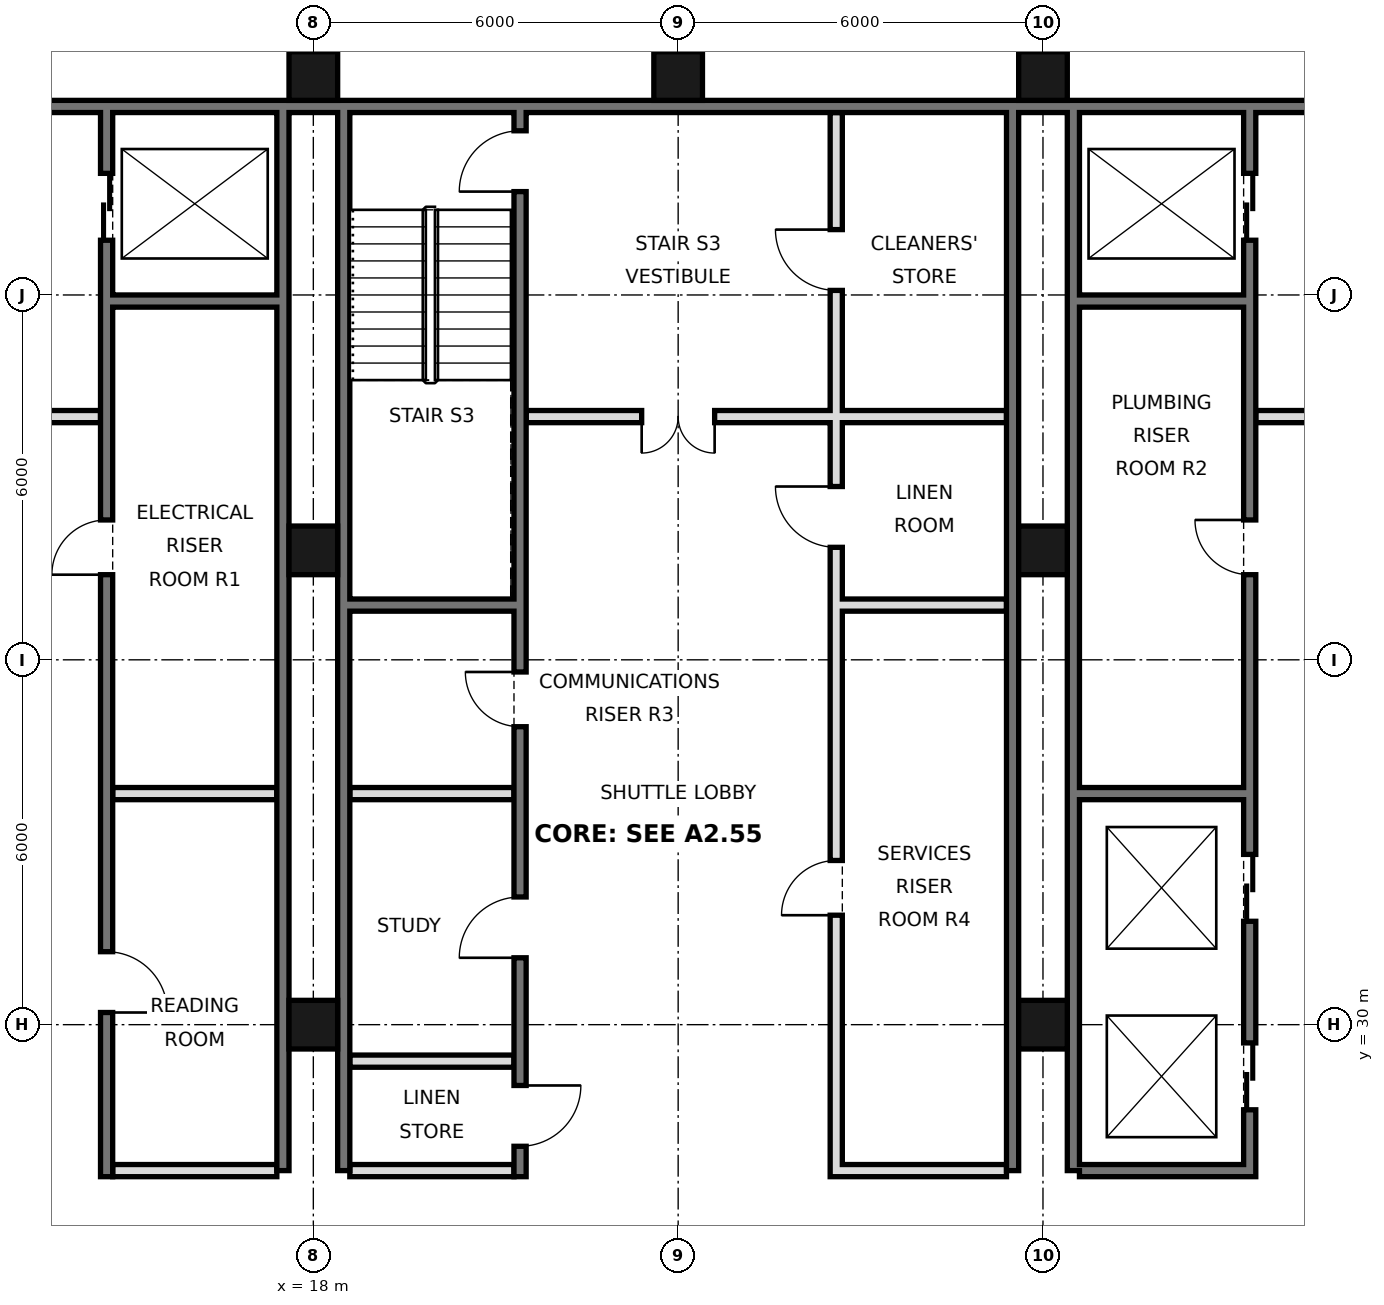
"""IFC4 building model, lengths in metres.
Left out: names, types, materials, properties, quantities, classifications, styles, units other than length and angle.
Written with IfcOpenShell. Run it as: python <this file> out.ifc"""

import sys

from ifc_helpers import new_model, si_unit, direction, frame, frame_2d, origin, origin_2d, place, context, subcontext, project, spatial, rectangle, hollow_rectangle, extrude, element, fill, save


model = new_model("IFC4")
c1 = context("Model", 3, precision=1e-05, world=origin(), true_north=direction((0.0, 1.0)))
c2 = subcontext(c1, "Body", "Model", "MODEL_VIEW")
j1 = project(units=[si_unit("LENGTHUNIT", "METRE"), si_unit("PLANEANGLEUNIT", "RADIAN")], contexts=[c1])
p1 = place(None, origin())
s1 = spatial("IfcSite", under=j1, at=p1, CompositionType="ELEMENT")
p2 = place(p1, origin())
s2 = spatial("IfcBuilding", under=s1, at=p2, CompositionType="ELEMENT")
p3 = place(p2, frame((0.0, 0.0, 219.0)))
s3 = spatial("IfcBuildingStorey", under=s2, at=p3, CompositionType="ELEMENT", Elevation=219.0)
for number, where, z_axis, x_axis in (
    (1, (18.0, 30.0, 0.0), (0.0, 0.0, 1.0), (1.0, 0.0, 0.0)),
    (2, (18.0, 37.8, 0.0), (0.0, 0.0, 1.0), (1.0, 0.0, 0.0)),
    (3, (18.0, 45.6, 0.0), (0.0, 0.0, 1.0), (1.0, 0.0, 0.0)),
    (4, (24.0, 45.6, 0.0), (0.0, 0.0, 1.0), (1.0, 0.0, 0.0)),
    (5, (30.0, 30.0, 0.0), (0.0, 0.0, 1.0), (1.0, 0.0, 0.0)),
    (6, (30.0, 37.8, 0.0), (0.0, 0.0, 1.0), (1.0, 0.0, 0.0)),
    (7, (30.0, 45.6, 0.0), (0.0, 0.0, 1.0), (1.0, 0.0, 0.0)),
):
    element("IfcColumn", number, at=place(p3, frame(where, z_axis=z_axis, x_axis=x_axis)), inside=s3, PredefinedType="COLUMN", context=c2, shape_type="SweptSolid", body=[
        extrude(hollow_rectangle(XDim=0.8, YDim=0.8, WallThickness=0.04, at=origin_2d()), origin(), (0.0, 0.0, 1.0), 3.6),
    ])
p4 = place(p3, frame((6.6, 45.1, 0.0), z_axis=(0.0, 0.0, 1.0), x_axis=(1.0, 0.0, 0.0)))
e8 = element("IfcWall", 8, at=p4, inside=s3, PredefinedType="SOLIDWALL", context=c2, shape_type="SweptSolid", body=[
    extrude(rectangle(XDim=34.8, YDim=0.2, at=frame_2d((17.4, 0.0))), origin(), (0.0, 0.0, 1.0), 3.42),
])
for number, where, z_axis, x_axis in (
    (9, (17.5, 27.6, 0.0), (0.0, 0.0, 1.0), (0.0, 1.0, 0.0)),
    (10, (18.5, 27.6, 0.0), (0.0, 0.0, 1.0), (0.0, 1.0, 0.0)),
    (11, (29.5, 27.6, 0.0), (0.0, 0.0, 1.0), (0.0, 1.0, 0.0)),
    (12, (30.5, 27.6, 0.0), (0.0, 0.0, 1.0), (0.0, 1.0, 0.0)),
):
    element("IfcWall", number, at=place(p3, frame(where, z_axis=z_axis, x_axis=x_axis)), inside=s3, PredefinedType="SOLIDWALL", context=c2, shape_type="SweptSolid", body=[
        extrude(rectangle(XDim=17.5, YDim=0.2, at=frame_2d((8.75, 0.0))), origin(), (0.0, 0.0, 1.0), 3.42),
    ])
p5 = place(p3, frame((14.6, 27.5, 0.0), z_axis=(0.0, 0.0, 1.0), x_axis=(0.0, 1.0, 0.0)))
e13 = element("IfcWall", 13, at=p5, inside=s3, PredefinedType="SOLIDWALL", context=c2, shape_type="SweptSolid", body=[
    extrude(rectangle(XDim=17.5, YDim=0.2, at=frame_2d((8.75, 0.0))), origin(), (0.0, 0.0, 1.0), 3.42),
])
p6 = place(p5, frame((15.4, 0.0, 0.0)))
e14 = element("IfcOpeningElement", 14, at=p6, cuts=e13, PredefinedType="OPENING", context=c2, shape_type="SweptSolid", body=[
    extrude(rectangle(XDim=1.1, YDim=2.1, at=frame_2d((0.55, 1.05))), frame((0.0, 0.11, 0.0), z_axis=(0.0, -1.0, 0.0), x_axis=(1.0, 0.0, 0.0)), (0.0, 0.0, 1.0), 0.22),
])
p7 = place(p5, frame((2.7, 0.0, 0.0)))
e15 = element("IfcOpeningElement", 15, at=p7, cuts=e13, PredefinedType="OPENING", context=c2, shape_type="SweptSolid", body=[
    extrude(rectangle(XDim=1.0, YDim=2.1, at=frame_2d((0.5, 1.05))), frame((0.0, 0.11, 0.0), z_axis=(0.0, -1.0, 0.0), x_axis=(1.0, 0.0, 0.0)), (0.0, 0.0, 1.0), 0.22),
])
p8 = place(p5, frame((9.9, 0.0, 0.0)))
e16 = element("IfcOpeningElement", 16, at=p8, cuts=e13, PredefinedType="OPENING", context=c2, shape_type="SweptSolid", body=[
    extrude(rectangle(XDim=0.9, YDim=2.1, at=frame_2d((0.45, 1.05))), frame((0.0, 0.11, 0.0), z_axis=(0.0, -1.0, 0.0), x_axis=(1.0, 0.0, 0.0)), (0.0, 0.0, 1.0), 0.22),
])
p9 = place(p3, frame((21.4, 27.5, 0.0), z_axis=(0.0, 0.0, 1.0), x_axis=(0.0, 1.0, 0.0)))
e17 = element("IfcWall", 17, at=p9, inside=s3, PredefinedType="SOLIDWALL", context=c2, shape_type="SweptSolid", body=[
    extrude(rectangle(XDim=17.5, YDim=0.2, at=frame_2d((8.75, 0.0))), origin(), (0.0, 0.0, 1.0), 3.42),
])
p10 = place(p9, frame((0.5, 0.0, 0.0)))
e18 = element("IfcOpeningElement", 18, at=p10, cuts=e17, PredefinedType="OPENING", context=c2, shape_type="SweptSolid", body=[
    extrude(rectangle(XDim=1.0, YDim=2.1, at=frame_2d((0.5, 1.05))), frame((0.0, 0.11, 0.0), z_axis=(0.0, -1.0, 0.0), x_axis=(1.0, 0.0, 0.0)), (0.0, 0.0, 1.0), 0.22),
])
p11 = place(p9, frame((3.6, 0.0, 0.0)))
e19 = element("IfcOpeningElement", 19, at=p11, cuts=e17, PredefinedType="OPENING", context=c2, shape_type="SweptSolid", body=[
    extrude(rectangle(XDim=1.0, YDim=2.1, at=frame_2d((0.5, 1.05))), frame((0.0, 0.11, 0.0), z_axis=(0.0, -1.0, 0.0), x_axis=(1.0, 0.0, 0.0)), (0.0, 0.0, 1.0), 0.22),
])
p12 = place(p9, frame((16.2, 0.0, 0.0)))
e20 = element("IfcOpeningElement", 20, at=p12, cuts=e17, PredefinedType="OPENING", context=c2, shape_type="SweptSolid", body=[
    extrude(rectangle(XDim=1.0, YDim=2.1, at=frame_2d((0.5, 1.05))), frame((0.0, 0.11, 0.0), z_axis=(0.0, -1.0, 0.0), x_axis=(1.0, 0.0, 0.0)), (0.0, 0.0, 1.0), 0.22),
])
p13 = place(p9, frame((7.4, 0.0, 0.0)))
e21 = element("IfcOpeningElement", 21, at=p13, cuts=e17, PredefinedType="OPENING", context=c2, shape_type="SweptSolid", body=[
    extrude(rectangle(XDim=0.9, YDim=2.1, at=frame_2d((0.45, 1.05))), frame((0.0, 0.11, 0.0), z_axis=(0.0, -1.0, 0.0), x_axis=(1.0, 0.0, 0.0)), (0.0, 0.0, 1.0), 0.22),
])
p14 = place(p3, frame((26.6, 27.5, 0.0), z_axis=(0.0, 0.0, 1.0), x_axis=(0.0, 1.0, 0.0)))
e22 = element("IfcWall", 22, at=p14, inside=s3, PredefinedType="SOLIDWALL", context=c2, shape_type="SweptSolid", body=[
    extrude(rectangle(XDim=17.5, YDim=0.2, at=frame_2d((8.75, 0.0))), origin(), (0.0, 0.0, 1.0), 3.42),
])
p15 = place(p14, frame((4.3, 0.0, 0.0)))
e23 = element("IfcOpeningElement", 23, at=p15, cuts=e22, PredefinedType="OPENING", context=c2, shape_type="SweptSolid", body=[
    extrude(rectangle(XDim=0.9, YDim=2.1, at=frame_2d((0.45, 1.05))), frame((0.0, 0.11, 0.0), z_axis=(0.0, -1.0, 0.0), x_axis=(1.0, 0.0, 0.0)), (0.0, 0.0, 1.0), 0.22),
])
p16 = place(p14, frame((10.35, 0.0, 0.0)))
e24 = element("IfcOpeningElement", 24, at=p16, cuts=e22, PredefinedType="OPENING", context=c2, shape_type="SweptSolid", body=[
    extrude(rectangle(XDim=1.0, YDim=2.1, at=frame_2d((0.5, 1.05))), frame((0.0, 0.11, 0.0), z_axis=(0.0, -1.0, 0.0), x_axis=(1.0, 0.0, 0.0)), (0.0, 0.0, 1.0), 0.22),
])
p17 = place(p14, frame((14.575, 0.0, 0.0)))
e25 = element("IfcOpeningElement", 25, at=p17, cuts=e22, PredefinedType="OPENING", context=c2, shape_type="SweptSolid", body=[
    extrude(rectangle(XDim=1.0, YDim=2.1, at=frame_2d((0.5, 1.05))), frame((0.0, 0.11, 0.0), z_axis=(0.0, -1.0, 0.0), x_axis=(1.0, 0.0, 0.0)), (0.0, 0.0, 1.0), 0.22),
])
p18 = place(p3, frame((33.4, 27.5, 0.0), z_axis=(0.0, 0.0, 1.0), x_axis=(0.0, 1.0, 0.0)))
e26 = element("IfcWall", 26, at=p18, inside=s3, PredefinedType="SOLIDWALL", context=c2, shape_type="SweptSolid", body=[
    extrude(rectangle(XDim=17.5, YDim=0.2, at=frame_2d((8.75, 0.0))), origin(), (0.0, 0.0, 1.0), 3.42),
])
p19 = place(p18, frame((1.1, 0.0, 0.0)))
e27 = element("IfcOpeningElement", 27, at=p19, cuts=e26, PredefinedType="OPENING", context=c2, shape_type="SweptSolid", body=[
    extrude(rectangle(XDim=1.1, YDim=2.1, at=frame_2d((0.55, 1.05))), frame((0.0, 0.11, 0.0), z_axis=(0.0, -1.0, 0.0), x_axis=(1.0, 0.0, 0.0)), (0.0, 0.0, 1.0), 0.22),
])
p20 = place(p18, frame((4.2, 0.0, 0.0)))
e28 = element("IfcOpeningElement", 28, at=p20, cuts=e26, PredefinedType="OPENING", context=c2, shape_type="SweptSolid", body=[
    extrude(rectangle(XDim=1.1, YDim=2.1, at=frame_2d((0.55, 1.05))), frame((0.0, 0.11, 0.0), z_axis=(0.0, -1.0, 0.0), x_axis=(1.0, 0.0, 0.0)), (0.0, 0.0, 1.0), 0.22),
])
p21 = place(p18, frame((15.4, 0.0, 0.0)))
e29 = element("IfcOpeningElement", 29, at=p21, cuts=e26, PredefinedType="OPENING", context=c2, shape_type="SweptSolid", body=[
    extrude(rectangle(XDim=1.1, YDim=2.1, at=frame_2d((0.55, 1.05))), frame((0.0, 0.11, 0.0), z_axis=(0.0, -1.0, 0.0), x_axis=(1.0, 0.0, 0.0)), (0.0, 0.0, 1.0), 0.22),
])
p22 = place(p18, frame((9.9, 0.0, 0.0)))
e30 = element("IfcOpeningElement", 30, at=p22, cuts=e26, PredefinedType="OPENING", context=c2, shape_type="SweptSolid", body=[
    extrude(rectangle(XDim=0.9, YDim=2.1, at=frame_2d((0.45, 1.05))), frame((0.0, 0.11, 0.0), z_axis=(0.0, -1.0, 0.0), x_axis=(1.0, 0.0, 0.0)), (0.0, 0.0, 1.0), 0.22),
])
for number, where, z_axis, x_axis in (
    (31, (14.7, 27.6, 0.0), (0.0, 0.0, 1.0), (1.0, 0.0, 0.0)),
    (32, (18.6, 27.6, 0.0), (0.0, 0.0, 1.0), (1.0, 0.0, 0.0)),
):
    element("IfcWall", number, at=place(p3, frame(where, z_axis=z_axis, x_axis=x_axis)), inside=s3, PredefinedType="PARTITIONING", context=c2, shape_type="SweptSolid", body=[
        extrude(rectangle(XDim=2.7, YDim=0.2, at=frame_2d((1.35, 0.0))), origin(), (0.0, 0.0, 1.0), 3.42),
    ])
for number, where, z_axis, x_axis in (
    (33, (26.7, 27.6, 0.0), (0.0, 0.0, 1.0), (1.0, 0.0, 0.0)),
    (34, (30.6, 27.6, 0.0), (0.0, 0.0, 1.0), (1.0, 0.0, 0.0)),
):
    element("IfcWall", number, at=place(p3, frame(where, z_axis=z_axis, x_axis=x_axis)), inside=s3, PredefinedType="SOLIDWALL", context=c2, shape_type="SweptSolid", body=[
        extrude(rectangle(XDim=2.7, YDim=0.2, at=frame_2d((1.35, 0.0))), origin(), (0.0, 0.0, 1.0), 3.42),
    ])
p23 = place(p3, frame((18.6, 29.4, 0.0), z_axis=(0.0, 0.0, 1.0), x_axis=(1.0, 0.0, 0.0)))
e35 = element("IfcWall", 35, at=p23, inside=s3, PredefinedType="PARTITIONING", context=c2, shape_type="SweptSolid", body=[
    extrude(rectangle(XDim=2.7, YDim=0.2, at=frame_2d((1.35, 0.0))), origin(), (0.0, 0.0, 1.0), 3.42),
])
for number, where, z_axis, x_axis in (
    (36, (14.7, 33.8, 0.0), (0.0, 0.0, 1.0), (1.0, 0.0, 0.0)),
    (37, (18.6, 33.8, 0.0), (0.0, 0.0, 1.0), (1.0, 0.0, 0.0)),
    (38, (30.6, 33.8, 0.0), (0.0, 0.0, 1.0), (1.0, 0.0, 0.0)),
    (39, (18.6, 36.9, 0.0), (0.0, 0.0, 1.0), (1.0, 0.0, 0.0)),
    (40, (26.7, 36.9, 0.0), (0.0, 0.0, 1.0), (1.0, 0.0, 0.0)),
):
    element("IfcWall", number, at=place(p3, frame(where, z_axis=z_axis, x_axis=x_axis)), inside=s3, PredefinedType="SOLIDWALL", context=c2, shape_type="SweptSolid", body=[
        extrude(rectangle(XDim=2.7, YDim=0.2, at=frame_2d((1.35, 0.0))), origin(), (0.0, 0.0, 1.0), 3.42),
    ])
p24 = place(p3, frame((21.5, 40.0, 0.0), z_axis=(0.0, 0.0, 1.0), x_axis=(1.0, 0.0, 0.0)))
e41 = element("IfcWall", 41, at=p24, inside=s3, PredefinedType="PARTITIONING", context=c2, shape_type="SweptSolid", body=[
    extrude(rectangle(XDim=7.9, YDim=0.2, at=frame_2d((3.95, 0.0))), origin(), (0.0, 0.0, 1.0), 3.42),
])
p25 = place(p24, frame((1.9, 0.0, 0.0)))
e42 = element("IfcOpeningElement", 42, at=p25, cuts=e41, PredefinedType="OPENING", context=c2, shape_type="SweptSolid", body=[
    extrude(rectangle(XDim=1.2, YDim=2.1, at=frame_2d((0.6, 1.05))), frame((0.0, 0.11, 0.0), z_axis=(0.0, -1.0, 0.0), x_axis=(1.0, 0.0, 0.0)), (0.0, 0.0, 1.0), 0.22),
])
p26 = place(p3, frame((33.5, 40.0, 0.0), z_axis=(0.0, 0.0, 1.0), x_axis=(1.0, 0.0, 0.0)))
e43 = element("IfcWall", 43, at=p26, inside=s3, PredefinedType="PARTITIONING", context=c2, shape_type="SweptSolid", body=[
    extrude(rectangle(XDim=5.0, YDim=0.2, at=frame_2d((2.5, 0.0))), origin(), (0.0, 0.0, 1.0), 3.42),
])
p27 = place(p26, frame((1.9, 0.0, 0.0)))
e44 = element("IfcOpeningElement", 44, at=p27, cuts=e43, PredefinedType="OPENING", context=c2, shape_type="SweptSolid", body=[
    extrude(rectangle(XDim=1.2, YDim=2.1, at=frame_2d((0.6, 1.05))), frame((0.0, 0.11, 0.0), z_axis=(0.0, -1.0, 0.0), x_axis=(1.0, 0.0, 0.0)), (0.0, 0.0, 1.0), 0.22),
])
p28 = place(p3, frame((9.5, 40.0, 0.0), z_axis=(0.0, 0.0, 1.0), x_axis=(1.0, 0.0, 0.0)))
e45 = element("IfcWall", 45, at=p28, inside=s3, PredefinedType="PARTITIONING", context=c2, shape_type="SweptSolid", body=[
    extrude(rectangle(XDim=5.0, YDim=0.2, at=frame_2d((2.5, 0.0))), origin(), (0.0, 0.0, 1.0), 3.42),
])
p29 = place(p28, frame((1.9, 0.0, 0.0)))
e46 = element("IfcOpeningElement", 46, at=p29, cuts=e45, PredefinedType="OPENING", context=c2, shape_type="SweptSolid", body=[
    extrude(rectangle(XDim=1.2, YDim=2.1, at=frame_2d((0.6, 1.05))), frame((0.0, 0.11, 0.0), z_axis=(0.0, -1.0, 0.0), x_axis=(1.0, 0.0, 0.0)), (0.0, 0.0, 1.0), 0.22),
])
for number, where, z_axis, x_axis in (
    (47, (14.7, 41.9, 0.0), (0.0, 0.0, 1.0), (1.0, 0.0, 0.0)),
    (48, (30.6, 41.9, 0.0), (0.0, 0.0, 1.0), (1.0, 0.0, 0.0)),
):
    element("IfcWall", number, at=place(p3, frame(where, z_axis=z_axis, x_axis=x_axis)), inside=s3, PredefinedType="SOLIDWALL", context=c2, shape_type="SweptSolid", body=[
        extrude(rectangle(XDim=2.7, YDim=0.2, at=frame_2d((1.35, 0.0))), origin(), (0.0, 0.0, 1.0), 3.42),
    ])
p30 = place(p25, frame((1.2, 0.0, 0.0), z_axis=(0.0, 0.0, 1.0), x_axis=(-1.0, 0.0, 0.0)))
e49 = element("IfcDoor", 49, at=p30, inside=s3, OperationType="DOUBLE_DOOR_SINGLE_SWING", PredefinedType="DOOR", context=c2, shape_type="SweptSolid", body=[
    extrude(rectangle(XDim=1.2, YDim=2.1, at=frame_2d((0.6, 1.05))), frame((0.0, 0.025, 0.0), z_axis=(0.0, -1.0, 0.0), x_axis=(1.0, 0.0, 0.0)), (0.0, 0.0, 1.0), 0.05),
])
fill(e42, e49)
p31 = place(p19, origin())
e50 = element("IfcDoor", 50, at=p31, inside=s3, OperationType="DOUBLE_DOOR_SLIDING", PredefinedType="DOOR", context=c2, shape_type="SweptSolid", body=[
    extrude(rectangle(XDim=1.1, YDim=2.1, at=frame_2d((0.55, 1.05))), frame((0.0, 0.025, 0.0), z_axis=(0.0, -1.0, 0.0), x_axis=(1.0, 0.0, 0.0)), (0.0, 0.0, 1.0), 0.05),
])
fill(e27, e50)
p32 = place(p20, origin())
e51 = element("IfcDoor", 51, at=p32, inside=s3, OperationType="DOUBLE_DOOR_SLIDING", PredefinedType="DOOR", context=c2, shape_type="SweptSolid", body=[
    extrude(rectangle(XDim=1.1, YDim=2.1, at=frame_2d((0.55, 1.05))), frame((0.0, 0.025, 0.0), z_axis=(0.0, -1.0, 0.0), x_axis=(1.0, 0.0, 0.0)), (0.0, 0.0, 1.0), 0.05),
])
fill(e28, e51)
p33 = place(p21, origin())
e52 = element("IfcDoor", 52, at=p33, inside=s3, OperationType="DOUBLE_DOOR_SLIDING", PredefinedType="DOOR", context=c2, shape_type="SweptSolid", body=[
    extrude(rectangle(XDim=1.1, YDim=2.1, at=frame_2d((0.55, 1.05))), frame((0.0, 0.025, 0.0), z_axis=(0.0, -1.0, 0.0), x_axis=(1.0, 0.0, 0.0)), (0.0, 0.0, 1.0), 0.05),
])
fill(e29, e52)
p34 = place(p6, origin())
e53 = element("IfcDoor", 53, at=p34, inside=s3, OperationType="DOUBLE_DOOR_SLIDING", PredefinedType="DOOR", context=c2, shape_type="SweptSolid", body=[
    extrude(rectangle(XDim=1.1, YDim=2.1, at=frame_2d((0.55, 1.05))), frame((0.0, 0.025, 0.0), z_axis=(0.0, -1.0, 0.0), x_axis=(1.0, 0.0, 0.0)), (0.0, 0.0, 1.0), 0.05),
])
fill(e14, e53)
p35 = place(p10, origin())
e54 = element("IfcDoor", 54, at=p35, inside=s3, OperationType="SINGLE_SWING_RIGHT", PredefinedType="DOOR", context=c2, shape_type="SweptSolid", body=[
    extrude(rectangle(XDim=1.0, YDim=2.1, at=frame_2d((0.5, 1.05))), frame((0.0, 0.025, 0.0), z_axis=(0.0, -1.0, 0.0), x_axis=(1.0, 0.0, 0.0)), (0.0, 0.0, 1.0), 0.05),
])
fill(e18, e54)
p36 = place(p11, origin())
e55 = element("IfcDoor", 55, at=p36, inside=s3, OperationType="SINGLE_SWING_LEFT", PredefinedType="DOOR", context=c2, shape_type="SweptSolid", body=[
    extrude(rectangle(XDim=1.0, YDim=2.1, at=frame_2d((0.5, 1.05))), frame((0.0, 0.025, 0.0), z_axis=(0.0, -1.0, 0.0), x_axis=(1.0, 0.0, 0.0)), (0.0, 0.0, 1.0), 0.05),
])
fill(e19, e55)
p37 = place(p7, frame((1.0, 0.0, 0.0), z_axis=(0.0, 0.0, 1.0), x_axis=(-1.0, 0.0, 0.0)))
e56 = element("IfcDoor", 56, at=p37, inside=s3, OperationType="SINGLE_SWING_RIGHT", PredefinedType="DOOR", context=c2, shape_type="SweptSolid", body=[
    extrude(rectangle(XDim=1.0, YDim=2.1, at=frame_2d((0.5, 1.05))), frame((0.0, 0.025, 0.0), z_axis=(0.0, -1.0, 0.0), x_axis=(1.0, 0.0, 0.0)), (0.0, 0.0, 1.0), 0.05),
])
fill(e15, e56)
p38 = place(p12, origin())
e57 = element("IfcDoor", 57, at=p38, inside=s3, OperationType="SINGLE_SWING_LEFT", PredefinedType="DOOR", context=c2, shape_type="SweptSolid", body=[
    extrude(rectangle(XDim=1.0, YDim=2.1, at=frame_2d((0.5, 1.05))), frame((0.0, 0.025, 0.0), z_axis=(0.0, -1.0, 0.0), x_axis=(1.0, 0.0, 0.0)), (0.0, 0.0, 1.0), 0.05),
])
fill(e20, e57)
p39 = place(p8, origin())
e58 = element("IfcDoor", 58, at=p39, inside=s3, OperationType="SINGLE_SWING_LEFT", PredefinedType="DOOR", context=c2, shape_type="SweptSolid", body=[
    extrude(rectangle(XDim=0.9, YDim=2.1, at=frame_2d((0.45, 1.05))), frame((0.0, 0.025, 0.0), z_axis=(0.0, -1.0, 0.0), x_axis=(1.0, 0.0, 0.0)), (0.0, 0.0, 1.0), 0.05),
])
fill(e16, e58)
p40 = place(p22, frame((0.9, 0.0, 0.0), z_axis=(0.0, 0.0, 1.0), x_axis=(-1.0, 0.0, 0.0)))
e59 = element("IfcDoor", 59, at=p40, inside=s3, OperationType="SINGLE_SWING_LEFT", PredefinedType="DOOR", context=c2, shape_type="SweptSolid", body=[
    extrude(rectangle(XDim=0.9, YDim=2.1, at=frame_2d((0.45, 1.05))), frame((0.0, 0.025, 0.0), z_axis=(0.0, -1.0, 0.0), x_axis=(1.0, 0.0, 0.0)), (0.0, 0.0, 1.0), 0.05),
])
fill(e30, e59)
p41 = place(p13, frame((0.9, 0.0, 0.0), z_axis=(0.0, 0.0, 1.0), x_axis=(-1.0, 0.0, 0.0)))
e60 = element("IfcDoor", 60, at=p41, inside=s3, OperationType="SINGLE_SWING_LEFT", PredefinedType="DOOR", context=c2, shape_type="SweptSolid", body=[
    extrude(rectangle(XDim=0.9, YDim=2.1, at=frame_2d((0.45, 1.05))), frame((0.0, 0.025, 0.0), z_axis=(0.0, -1.0, 0.0), x_axis=(1.0, 0.0, 0.0)), (0.0, 0.0, 1.0), 0.05),
])
fill(e21, e60)
p42 = place(p15, origin())
e61 = element("IfcDoor", 61, at=p42, inside=s3, OperationType="SINGLE_SWING_LEFT", PredefinedType="DOOR", context=c2, shape_type="SweptSolid", body=[
    extrude(rectangle(XDim=0.9, YDim=2.1, at=frame_2d((0.45, 1.05))), frame((0.0, 0.025, 0.0), z_axis=(0.0, -1.0, 0.0), x_axis=(1.0, 0.0, 0.0)), (0.0, 0.0, 1.0), 0.05),
])
fill(e23, e61)
p43 = place(p16, frame((1.0, 0.0, 0.0), z_axis=(0.0, 0.0, 1.0), x_axis=(-1.0, 0.0, 0.0)))
e62 = element("IfcDoor", 62, at=p43, inside=s3, OperationType="SINGLE_SWING_LEFT", PredefinedType="DOOR", context=c2, shape_type="SweptSolid", body=[
    extrude(rectangle(XDim=1.0, YDim=2.1, at=frame_2d((0.5, 1.05))), frame((0.0, 0.025, 0.0), z_axis=(0.0, -1.0, 0.0), x_axis=(1.0, 0.0, 0.0)), (0.0, 0.0, 1.0), 0.05),
])
fill(e24, e62)
p44 = place(p17, frame((1.0, 0.0, 0.0), z_axis=(0.0, 0.0, 1.0), x_axis=(-1.0, 0.0, 0.0)))
e63 = element("IfcDoor", 63, at=p44, inside=s3, OperationType="SINGLE_SWING_LEFT", PredefinedType="DOOR", context=c2, shape_type="SweptSolid", body=[
    extrude(rectangle(XDim=1.0, YDim=2.1, at=frame_2d((0.5, 1.05))), frame((0.0, 0.025, 0.0), z_axis=(0.0, -1.0, 0.0), x_axis=(1.0, 0.0, 0.0)), (0.0, 0.0, 1.0), 0.05),
])
fill(e25, e63)
save(model, sys.argv[1])
